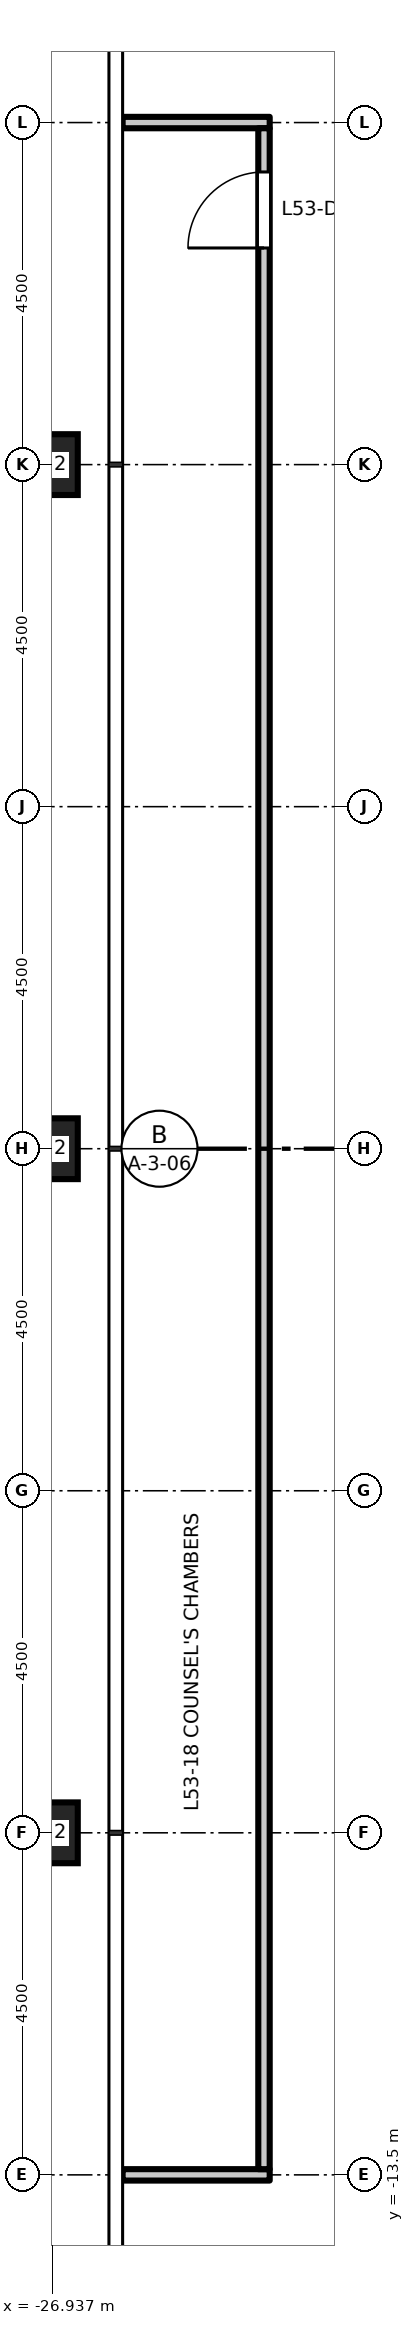
"""IFC4 building model, lengths in metres.
Left out: names, types, materials, properties, quantities, classifications, styles, units other than length and angle.
Written with IfcOpenShell. Run it as: python <this file> out.ifc"""

import sys

from ifc_helpers import new_model, si_unit, direction, frame, frame_2d, origin, origin_2d, place, context, subcontext, project, spatial, rectangle, hollow_rectangle, extrude, element, fill, save


model = new_model("IFC4")
c1 = context("Model", 3, precision=1e-05, world=origin(), true_north=direction((0.0, 1.0)))
c2 = subcontext(c1, "Body", "Model", "MODEL_VIEW")
j1 = project(units=[si_unit("LENGTHUNIT", "METRE"), si_unit("PLANEANGLEUNIT", "RADIAN")], contexts=[c1])
p1 = place(None, origin())
s1 = spatial("IfcSite", under=j1, at=p1, CompositionType="ELEMENT")
p2 = place(p1, origin())
s2 = spatial("IfcBuilding", under=s1, at=p2, CompositionType="ELEMENT")
p3 = place(p2, frame((0.0, 0.0, 246.7)))
s3 = spatial("IfcBuildingStorey", under=s2, at=p3, CompositionType="ELEMENT", Elevation=246.7)
for number, where, z_axis, x_axis in (
    (1, (-27.0, 9.0, 0.0), (0.0, 0.0, 1.0), (1.0, 0.0, 0.0)),
    (2, (-27.0, 0.0, 0.0), (0.0, 0.0, 1.0), (1.0, 0.0, 0.0)),
    (3, (-27.0, -9.0, 0.0), (0.0, 0.0, 1.0), (1.0, 0.0, 0.0)),
):
    element("IfcColumn", number, at=place(p3, frame(where, z_axis=z_axis, x_axis=x_axis)), inside=s3, PredefinedType="COLUMN", context=c2, shape_type="SweptSolid", body=[
        extrude(hollow_rectangle(XDim=0.8, YDim=0.8, WallThickness=0.045, at=origin_2d()), origin(), (0.0, 0.0, 1.0), 4.5),
    ])
p4 = place(p3, frame((-26.01, -13.5, 0.0), z_axis=(0.0, 0.0, 1.0), x_axis=(1.0, 0.0, 0.0)))
e4 = element("IfcWall", 4, at=p4, inside=s3, PredefinedType="PARTITIONING", context=c2, shape_type="SweptSolid", body=[
    extrude(rectangle(XDim=1.935, YDim=0.15, at=frame_2d((0.968, 0.0))), origin(), (0.0, 0.0, 1.0), 3.95),
])
p5 = place(p3, frame((-26.01, 13.5, 0.0), z_axis=(0.0, 0.0, 1.0), x_axis=(1.0, 0.0, 0.0)))
e5 = element("IfcWall", 5, at=p5, inside=s3, PredefinedType="PARTITIONING", context=c2, shape_type="SweptSolid", body=[
    extrude(rectangle(XDim=1.935, YDim=0.15, at=frame_2d((0.968, 0.0))), origin(), (0.0, 0.0, 1.0), 4.35),
])
p6 = place(p3, frame((-24.15, -13.425, 0.0), z_axis=(0.0, 0.0, 1.0), x_axis=(0.0, 1.0, 0.0)))
e6 = element("IfcWall", 6, at=p6, inside=s3, PredefinedType="PARTITIONING", context=c2, shape_type="SweptSolid", body=[
    extrude(rectangle(XDim=26.85, YDim=0.15, at=frame_2d((13.425, 0.0))), origin(), (0.0, 0.0, 1.0), 4.35),
])
p7 = place(p6, frame((25.275, 0.0, 0.0)))
e7 = element("IfcOpeningElement", 7, at=p7, cuts=e6, PredefinedType="OPENING", context=c2, shape_type="SweptSolid", body=[
    extrude(rectangle(XDim=1.0, YDim=2.1, at=frame_2d((0.5, 1.05))), frame((0.0, 0.085, 0.0), z_axis=(0.0, -1.0, 0.0), x_axis=(1.0, 0.0, 0.0)), (0.0, 0.0, 1.0), 0.17),
])
p8 = place(p7, origin())
e8 = element("IfcDoor", 8, at=p8, inside=s3, OperationType="SINGLE_SWING_LEFT", PredefinedType="DOOR", context=c2, shape_type="SweptSolid", body=[
    extrude(rectangle(XDim=1.0, YDim=2.1, at=frame_2d((0.5, 1.05))), frame((0.0, 0.025, 0.0), z_axis=(0.0, -1.0, 0.0), x_axis=(1.0, 0.0, 0.0)), (0.0, 0.0, 1.0), 0.05),
])
fill(e7, e8)
save(model, sys.argv[1])
